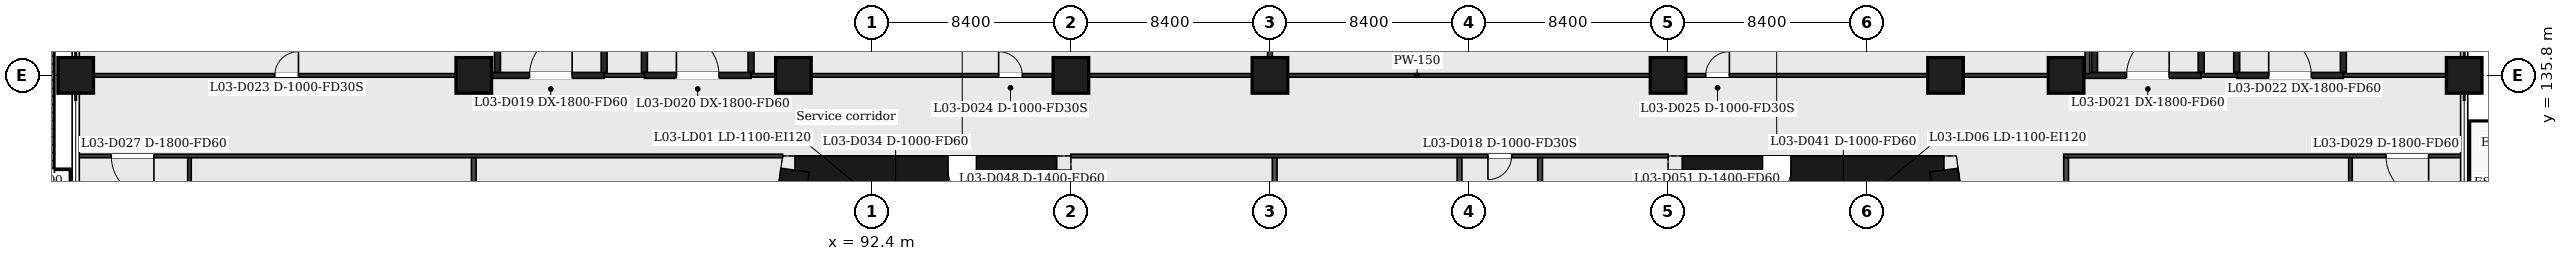
"""IFC4 building model, lengths in metres.
Left out: names, types, materials, properties, quantities, classifications, styles, units other than length and angle.
Written with IfcOpenShell. Run it as: python <this file> out.ifc"""

import sys

from ifc_helpers import new_model, si_unit, direction, frame, frame_2d, origin, origin_2d, place, context, subcontext, project, spatial, rectangle, extrude, element, fill, save


model = new_model("IFC4")
c1 = context("Model", 3, precision=1e-05, world=origin(), true_north=direction((0.0, 1.0)))
c2 = subcontext(c1, "Body", "Model", "MODEL_VIEW")
j1 = project(units=[si_unit("LENGTHUNIT", "METRE"), si_unit("PLANEANGLEUNIT", "RADIAN")], contexts=[c1])
p1 = place(None, origin())
s1 = spatial("IfcSite", under=j1, at=p1, CompositionType="ELEMENT")
p2 = place(p1, origin())
s2 = spatial("IfcBuilding", under=s1, at=p2, CompositionType="ELEMENT")
p3 = place(p2, frame((0.0, 0.0, 23.0)))
s3 = spatial("IfcBuildingStorey", under=s2, at=p3, CompositionType="ELEMENT", Elevation=23.0)
p4 = place(p3, frame((89.156, 131.8, 0.0), z_axis=(0.0, 0.0, 1.0), x_axis=(1.0, 0.0, 0.0)))
e1 = element("IfcWall", 1, at=p4, inside=s3, PredefinedType="SHEAR", context=c2, shape_type="SweptSolid", body=[
    extrude(rectangle(XDim=11.044, YDim=1.2, at=frame_2d((5.522, 0.0))), origin(), (0.0, 0.0, 1.0), 6.0),
])
p5 = place(p4, frame((6.458, 0.0, 0.0)))
e2 = element("IfcOpeningElement", 2, at=p5, cuts=e1, PredefinedType="OPENING", context=c2, shape_type="SweptSolid", body=[
    extrude(rectangle(XDim=1.2, YDim=2.1, at=frame_2d((0.6, 1.05))), frame((0.0, 0.61, 0.0), z_axis=(0.0, -1.0, 0.0), x_axis=(1.0, 0.0, 0.0)), (0.0, 0.0, 1.0), 1.22),
])
p6 = place(p3, frame((100.2, 131.8, 0.0), z_axis=(0.0, 0.0, 1.0), x_axis=(0.0, -1.0, 0.0)))
e3 = element("IfcWall", 3, at=p6, inside=s3, PredefinedType="SHEAR", context=c2, shape_type="SweptSolid", body=[
    extrude(rectangle(XDim=20.8, YDim=1.2, at=frame_2d((10.4, 0.0))), origin(), (0.0, 0.0, 1.0), 6.0),
])
p7 = place(p6, frame((7.65, 0.0, 0.0)))
e4 = element("IfcOpeningElement", 4, at=p7, cuts=e3, PredefinedType="OPENING", context=c2, shape_type="SweptSolid", body=[
    extrude(rectangle(XDim=1.4, YDim=2.1, at=frame_2d((0.7, 1.05))), frame((0.0, 0.61, 0.0), z_axis=(0.0, -1.0, 0.0), x_axis=(1.0, 0.0, 0.0)), (0.0, 0.0, 1.0), 1.22),
])
p8 = place(p3, frame((86.355, 111.0, 0.0), z_axis=(0.0, 0.0, 1.0), x_axis=(0.133413989637, 0.99106039542, 0.0)))
e5 = element("IfcWall", 5, at=p8, inside=s3, PredefinedType="SHEAR", context=c2, shape_type="SweptSolid", body=[
    extrude(rectangle(XDim=20.988, YDim=1.2, at=frame_2d((10.494, 0.0))), origin(), (0.0, 0.0, 1.0), 6.0),
])
p9 = place(p3, frame((126.6, 131.8, 0.0), z_axis=(0.0, 0.0, 1.0), x_axis=(1.0, 0.0, 0.0)))
e6 = element("IfcWall", 6, at=p9, inside=s3, PredefinedType="SHEAR", context=c2, shape_type="SweptSolid", body=[
    extrude(rectangle(XDim=11.044, YDim=1.2, at=frame_2d((5.522, 0.0))), origin(), (0.0, 0.0, 1.0), 6.0),
])
p10 = place(p9, frame((3.386, 0.0, 0.0)))
e7 = element("IfcOpeningElement", 7, at=p10, cuts=e6, PredefinedType="OPENING", context=c2, shape_type="SweptSolid", body=[
    extrude(rectangle(XDim=1.2, YDim=2.1, at=frame_2d((0.6, 1.05))), frame((0.0, 0.61, 0.0), z_axis=(0.0, -1.0, 0.0), x_axis=(1.0, 0.0, 0.0)), (0.0, 0.0, 1.0), 1.22),
])
p11 = place(p3, frame((137.645, 131.8, 0.0), z_axis=(0.0, 0.0, 1.0), x_axis=(0.133413989637, -0.99106039542, 0.0)))
e8 = element("IfcWall", 8, at=p11, inside=s3, PredefinedType="SHEAR", context=c2, shape_type="SweptSolid", body=[
    extrude(rectangle(XDim=20.988, YDim=1.2, at=frame_2d((10.494, 0.0))), origin(), (0.0, 0.0, 1.0), 6.0),
])
p12 = place(p3, frame((126.6, 111.0, 0.0), z_axis=(0.0, 0.0, 1.0), x_axis=(0.0, 1.0, 0.0)))
e9 = element("IfcWall", 9, at=p12, inside=s3, PredefinedType="SHEAR", context=c2, shape_type="SweptSolid", body=[
    extrude(rectangle(XDim=20.8, YDim=1.2, at=frame_2d((10.4, 0.0))), origin(), (0.0, 0.0, 1.0), 6.0),
])
p13 = place(p12, frame((11.75, 0.0, 0.0)))
e10 = element("IfcOpeningElement", 10, at=p13, cuts=e9, PredefinedType="OPENING", context=c2, shape_type="SweptSolid", body=[
    extrude(rectangle(XDim=1.4, YDim=2.1, at=frame_2d((0.7, 1.05))), frame((0.0, 0.61, 0.0), z_axis=(0.0, -1.0, 0.0), x_axis=(1.0, 0.0, 0.0)), (0.0, 0.0, 1.0), 1.22),
])
for number, where, z_axis, x_axis in (
    (11, (58.8, 135.8, 0.0), (0.0, 0.0, 1.0), (1.0, 0.0, 0.0)),
    (12, (75.6, 135.8, 0.0), (0.0, 0.0, 1.0), (1.0, 0.0, 0.0)),
    (13, (89.088, 135.8, 0.0), (0.0, 0.0, 1.0), (1.0, 0.0, 0.0)),
    (14, (100.8, 135.8, 0.0), (0.0, 0.0, 1.0), (1.0, 0.0, 0.0)),
    (15, (109.2, 135.8, 0.0), (0.0, 0.0, 1.0), (1.0, 0.0, 0.0)),
    (16, (126.0, 135.8, 0.0), (0.0, 0.0, 1.0), (1.0, 0.0, 0.0)),
    (17, (137.711, 135.8, 0.0), (0.0, 0.0, 1.0), (1.0, 0.0, 0.0)),
    (18, (142.8, 135.8, 0.0), (0.0, 0.0, 1.0), (1.0, 0.0, 0.0)),
    (19, (159.6, 135.8, 0.0), (0.0, 0.0, 1.0), (1.0, 0.0, 0.0)),
):
    element("IfcColumn", number, at=place(p3, frame(where, z_axis=z_axis, x_axis=x_axis)), inside=s3, PredefinedType="COLUMN", context=c2, shape_type="SweptSolid", body=[
        extrude(rectangle(XDim=1.5, YDim=1.5, at=origin_2d()), origin(), (0.0, 0.0, 1.0), 6.0),
    ])
p14 = place(p3, frame((58.85, 132.4, 0.0), z_axis=(0.0, 0.0, 1.0), x_axis=(1.0, 0.0, 0.0)))
e20 = element("IfcWall", 20, at=p14, inside=s3, PredefinedType="PARTITIONING", context=c2, shape_type="SweptSolid", body=[
    extrude(rectangle(XDim=29.781, YDim=0.15, at=frame_2d((14.891, 0.0))), origin(), (0.0, 0.0, 1.0), 5.5),
])
p15 = place(p14, frame((1.45, 0.0, 0.0)))
e21 = element("IfcOpeningElement", 21, at=p15, cuts=e20, PredefinedType="OPENING", context=c2, shape_type="SweptSolid", body=[
    extrude(rectangle(XDim=1.8, YDim=2.1, at=frame_2d((0.9, 1.05))), frame((0.0, 0.085, 0.0), z_axis=(0.0, -1.0, 0.0), x_axis=(1.0, 0.0, 0.0)), (0.0, 0.0, 1.0), 0.17),
])
p16 = place(p3, frame((100.8, 132.4, 0.0), z_axis=(0.0, 0.0, 1.0), x_axis=(1.0, 0.0, 0.0)))
e22 = element("IfcWall", 22, at=p16, inside=s3, PredefinedType="PARTITIONING", context=c2, shape_type="SweptSolid", body=[
    extrude(rectangle(XDim=25.2, YDim=0.15, at=frame_2d((12.6, 0.0))), origin(), (0.0, 0.0, 1.0), 5.5),
])
p17 = place(p16, frame((17.6, 0.0, 0.0)))
e23 = element("IfcOpeningElement", 23, at=p17, cuts=e22, PredefinedType="OPENING", context=c2, shape_type="SweptSolid", body=[
    extrude(rectangle(XDim=1.0, YDim=2.1, at=frame_2d((0.5, 1.05))), frame((0.0, 0.085, 0.0), z_axis=(0.0, -1.0, 0.0), x_axis=(1.0, 0.0, 0.0)), (0.0, 0.0, 1.0), 0.17),
])
p18 = place(p3, frame((142.7, 132.4, 0.0), z_axis=(0.0, 0.0, 1.0), x_axis=(1.0, 0.0, 0.0)))
e24 = element("IfcWall", 24, at=p18, inside=s3, PredefinedType="PARTITIONING", context=c2, shape_type="SweptSolid", body=[
    extrude(rectangle(XDim=16.85, YDim=0.15, at=frame_2d((8.425, 0.0))), origin(), (0.0, 0.0, 1.0), 5.5),
])
p19 = place(p18, frame((13.6, 0.0, 0.0)))
e25 = element("IfcOpeningElement", 25, at=p19, cuts=e24, PredefinedType="OPENING", context=c2, shape_type="SweptSolid", body=[
    extrude(rectangle(XDim=1.8, YDim=2.1, at=frame_2d((0.9, 1.05))), frame((0.0, 0.085, 0.0), z_axis=(0.0, -1.0, 0.0), x_axis=(1.0, 0.0, 0.0)), (0.0, 0.0, 1.0), 0.17),
])
p20 = place(p3, frame((76.32, 135.8, 0.0), z_axis=(0.0, 0.0, 1.0), x_axis=(1.0, 0.0, 0.0)))
e26 = element("IfcWall", 26, at=p20, inside=s3, PredefinedType="PARTITIONING", context=c2, shape_type="SweptSolid", body=[
    extrude(rectangle(XDim=4.78, YDim=0.25, at=frame_2d((2.39, 0.0))), origin(), (0.0, 0.0, 1.0), 5.5),
])
p21 = place(p20, frame((1.63, 0.0, 0.0)))
e27 = element("IfcOpeningElement", 27, at=p21, cuts=e26, PredefinedType="OPENING", context=c2, shape_type="SweptSolid", body=[
    extrude(rectangle(XDim=1.8, YDim=2.1, at=frame_2d((0.9, 1.05))), frame((0.0, 0.135, 0.0), z_axis=(0.0, -1.0, 0.0), x_axis=(1.0, 0.0, 0.0)), (0.0, 0.0, 1.0), 0.27),
])
p22 = place(p3, frame((82.8, 135.8, 0.0), z_axis=(0.0, 0.0, 1.0), x_axis=(1.0, 0.0, 0.0)))
e28 = element("IfcWall", 28, at=p22, inside=s3, PredefinedType="PARTITIONING", context=c2, shape_type="SweptSolid", body=[
    extrude(rectangle(XDim=4.5, YDim=0.25, at=frame_2d((2.25, 0.0))), origin(), (0.0, 0.0, 1.0), 5.5),
])
p23 = place(p22, frame((1.35, 0.0, 0.0)))
e29 = element("IfcOpeningElement", 29, at=p23, cuts=e28, PredefinedType="OPENING", context=c2, shape_type="SweptSolid", body=[
    extrude(rectangle(XDim=1.8, YDim=2.1, at=frame_2d((0.9, 1.05))), frame((0.0, 0.135, 0.0), z_axis=(0.0, -1.0, 0.0), x_axis=(1.0, 0.0, 0.0)), (0.0, 0.0, 1.0), 0.27),
])
p24 = place(p3, frame((143.52, 135.8, 0.0), z_axis=(0.0, 0.0, 1.0), x_axis=(1.0, 0.0, 0.0)))
e30 = element("IfcWall", 30, at=p24, inside=s3, PredefinedType="PARTITIONING", context=c2, shape_type="SweptSolid", body=[
    extrude(rectangle(XDim=4.98, YDim=0.25, at=frame_2d((2.49, 0.0))), origin(), (0.0, 0.0, 1.0), 5.5),
])
p25 = place(p24, frame((1.83, 0.0, 0.0)))
e31 = element("IfcOpeningElement", 31, at=p25, cuts=e30, PredefinedType="OPENING", context=c2, shape_type="SweptSolid", body=[
    extrude(rectangle(XDim=1.8, YDim=2.1, at=frame_2d((0.9, 1.05))), frame((0.0, 0.135, 0.0), z_axis=(0.0, -1.0, 0.0), x_axis=(1.0, 0.0, 0.0)), (0.0, 0.0, 1.0), 0.27),
])
p26 = place(p3, frame((150.0, 135.8, 0.0), z_axis=(0.0, 0.0, 1.0), x_axis=(1.0, 0.0, 0.0)))
e32 = element("IfcWall", 32, at=p26, inside=s3, PredefinedType="PARTITIONING", context=c2, shape_type="SweptSolid", body=[
    extrude(rectangle(XDim=4.5, YDim=0.25, at=frame_2d((2.25, 0.0))), origin(), (0.0, 0.0, 1.0), 5.5),
])
p27 = place(p26, frame((1.35, 0.0, 0.0)))
e33 = element("IfcOpeningElement", 33, at=p27, cuts=e32, PredefinedType="OPENING", context=c2, shape_type="SweptSolid", body=[
    extrude(rectangle(XDim=1.8, YDim=2.1, at=frame_2d((0.9, 1.05))), frame((0.0, 0.135, 0.0), z_axis=(0.0, -1.0, 0.0), x_axis=(1.0, 0.0, 0.0)), (0.0, 0.0, 1.0), 0.27),
])
p28 = place(p3, frame((58.85, 135.8, 0.0), z_axis=(0.0, 0.0, 1.0), x_axis=(1.0, 0.0, 0.0)))
e34 = element("IfcWall", 34, at=p28, inside=s3, PredefinedType="PARTITIONING", context=c2, shape_type="SweptSolid", body=[
    extrude(rectangle(XDim=17.47, YDim=0.15, at=frame_2d((8.735, 0.0))), origin(), (0.0, 0.0, 1.0), 5.5),
])
p29 = place(p28, frame((8.35, 0.0, 0.0)))
e35 = element("IfcOpeningElement", 35, at=p29, cuts=e34, PredefinedType="OPENING", context=c2, shape_type="SweptSolid", body=[
    extrude(rectangle(XDim=1.0, YDim=2.1, at=frame_2d((0.5, 1.05))), frame((0.0, 0.085, 0.0), z_axis=(0.0, -1.0, 0.0), x_axis=(1.0, 0.0, 0.0)), (0.0, 0.0, 1.0), 0.17),
])
p30 = place(p3, frame((81.1, 135.8, 0.0), z_axis=(0.0, 0.0, 1.0), x_axis=(1.0, 0.0, 0.0)))
e36 = element("IfcWall", 36, at=p30, inside=s3, PredefinedType="PARTITIONING", context=c2, shape_type="SweptSolid", body=[
    extrude(rectangle(XDim=1.7, YDim=0.15, at=frame_2d((0.85, 0.0))), origin(), (0.0, 0.0, 1.0), 5.5),
])
p31 = place(p3, frame((87.3, 135.8, 0.0), z_axis=(0.0, 0.0, 1.0), x_axis=(1.0, 0.0, 0.0)))
e37 = element("IfcWall", 37, at=p31, inside=s3, PredefinedType="PARTITIONING", context=c2, shape_type="SweptSolid", body=[
    extrude(rectangle(XDim=56.22, YDim=0.15, at=frame_2d((28.11, 0.0))), origin(), (0.0, 0.0, 1.0), 5.5),
])
p32 = place(p31, frame((10.45, 0.0, 0.0)))
e38 = element("IfcOpeningElement", 38, at=p32, cuts=e37, PredefinedType="OPENING", context=c2, shape_type="SweptSolid", body=[
    extrude(rectangle(XDim=1.0, YDim=2.1, at=frame_2d((0.5, 1.05))), frame((0.0, 0.085, 0.0), z_axis=(0.0, -1.0, 0.0), x_axis=(1.0, 0.0, 0.0)), (0.0, 0.0, 1.0), 0.17),
])
p33 = place(p31, frame((40.29, 0.0, 0.0)))
e39 = element("IfcOpeningElement", 39, at=p33, cuts=e37, PredefinedType="OPENING", context=c2, shape_type="SweptSolid", body=[
    extrude(rectangle(XDim=1.0, YDim=2.1, at=frame_2d((0.5, 1.05))), frame((0.0, 0.085, 0.0), z_axis=(0.0, -1.0, 0.0), x_axis=(1.0, 0.0, 0.0)), (0.0, 0.0, 1.0), 0.17),
])
p34 = place(p3, frame((148.5, 135.8, 0.0), z_axis=(0.0, 0.0, 1.0), x_axis=(1.0, 0.0, 0.0)))
e40 = element("IfcWall", 40, at=p34, inside=s3, PredefinedType="PARTITIONING", context=c2, shape_type="SweptSolid", body=[
    extrude(rectangle(XDim=1.5, YDim=0.15, at=frame_2d((0.75, 0.0))), origin(), (0.0, 0.0, 1.0), 5.5),
])
p35 = place(p3, frame((154.5, 135.8, 0.0), z_axis=(0.0, 0.0, 1.0), x_axis=(1.0, 0.0, 0.0)))
e41 = element("IfcWall", 41, at=p35, inside=s3, PredefinedType="PARTITIONING", context=c2, shape_type="SweptSolid", body=[
    extrude(rectangle(XDim=5.05, YDim=0.15, at=frame_2d((2.525, 0.0))), origin(), (0.0, 0.0, 1.0), 5.5),
])
p36 = place(p3, frame((63.6, 110.475, 0.0), z_axis=(0.0, 0.0, 1.0), x_axis=(0.0, 1.0, 0.0)))
e42 = element("IfcWall", 42, at=p36, inside=s3, PredefinedType="PARTITIONING", context=c2, shape_type="SweptSolid", body=[
    extrude(rectangle(XDim=21.85, YDim=0.15, at=frame_2d((10.925, 0.0))), origin(), (0.0, 0.0, 1.0), 5.5),
])
p37 = place(p3, frame((75.6, 110.475, 0.0), z_axis=(0.0, 0.0, 1.0), x_axis=(0.0, 1.0, 0.0)))
e43 = element("IfcWall", 43, at=p37, inside=s3, PredefinedType="PARTITIONING", context=c2, shape_type="SweptSolid", body=[
    extrude(rectangle(XDim=21.85, YDim=0.2, at=frame_2d((10.925, 0.0))), origin(), (0.0, 0.0, 1.0), 5.1),
])
for number, where, z_axis, x_axis in (
    (44, (76.6, 135.925, 0.0), (0.0, 0.0, 1.0), (0.0, 1.0, 0.0)),
    (45, (81.1, 135.925, 0.0), (0.0, 0.0, 1.0), (0.0, 1.0, 0.0)),
    (46, (82.8, 135.925, 0.0), (0.0, 0.0, 1.0), (0.0, 1.0, 0.0)),
    (47, (87.3, 135.925, 0.0), (0.0, 0.0, 1.0), (0.0, 1.0, 0.0)),
):
    element("IfcWall", number, at=place(p3, frame(where, z_axis=z_axis, x_axis=x_axis)), inside=s3, PredefinedType="PARTITIONING", context=c2, shape_type="SweptSolid", body=[
        extrude(rectangle(XDim=8.825, YDim=0.25, at=frame_2d((4.413, 0.0))), origin(), (0.0, 0.0, 1.0), 5.5),
    ])
p38 = place(p3, frame((109.2, 135.875, 0.0), z_axis=(0.0, 0.0, 1.0), x_axis=(0.0, 1.0, 0.0)))
e48 = element("IfcWall", 48, at=p38, inside=s3, PredefinedType="PARTITIONING", context=c2, shape_type="SweptSolid", body=[
    extrude(rectangle(XDim=8.875, YDim=0.2, at=frame_2d((4.438, 0.0))), origin(), (0.0, 0.0, 1.0), 5.5),
])
for number, where, z_axis, x_axis in (
    (49, (109.4, 122.975, 0.0), (0.0, 0.0, 1.0), (0.0, 1.0, 0.0)),
    (50, (117.2, 122.975, 0.0), (0.0, 0.0, 1.0), (0.0, 1.0, 0.0)),
    (51, (120.6, 122.975, 0.0), (0.0, 0.0, 1.0), (0.0, 1.0, 0.0)),
):
    element("IfcWall", number, at=place(p3, frame(where, z_axis=z_axis, x_axis=x_axis)), inside=s3, PredefinedType="PARTITIONING", context=c2, shape_type="SweptSolid", body=[
        extrude(rectangle(XDim=9.35, YDim=0.2, at=frame_2d((4.675, 0.0))), origin(), (0.0, 0.0, 1.0), 5.5),
    ])
p39 = place(p3, frame((142.8, 110.475, 0.0), z_axis=(0.0, 0.0, 1.0), x_axis=(0.0, 1.0, 0.0)))
e52 = element("IfcWall", 52, at=p39, inside=s3, PredefinedType="PARTITIONING", context=c2, shape_type="SweptSolid", body=[
    extrude(rectangle(XDim=21.85, YDim=0.2, at=frame_2d((10.925, 0.0))), origin(), (0.0, 0.0, 1.0), 5.5),
])
p40 = place(p3, frame((143.7, 135.875, 0.0), z_axis=(0.0, 0.0, 1.0), x_axis=(0.0, 1.0, 0.0)))
e53 = element("IfcWall", 53, at=p40, inside=s3, PredefinedType="PARTITIONING", context=c2, shape_type="SweptSolid", body=[
    extrude(rectangle(XDim=8.875, YDim=0.2, at=frame_2d((4.438, 0.0))), origin(), (0.0, 0.0, 1.0), 5.5),
])
for number, where, z_axis, x_axis in (
    (54, (144.0, 135.925, 0.0), (0.0, 0.0, 1.0), (0.0, 1.0, 0.0)),
    (55, (148.5, 135.925, 0.0), (0.0, 0.0, 1.0), (0.0, 1.0, 0.0)),
    (56, (150.0, 135.925, 0.0), (0.0, 0.0, 1.0), (0.0, 1.0, 0.0)),
    (57, (154.5, 135.925, 0.0), (0.0, 0.0, 1.0), (0.0, 1.0, 0.0)),
):
    element("IfcWall", number, at=place(p3, frame(where, z_axis=z_axis, x_axis=x_axis)), inside=s3, PredefinedType="PARTITIONING", context=c2, shape_type="SweptSolid", body=[
        extrude(rectangle(XDim=8.825, YDim=0.25, at=frame_2d((4.413, 0.0))), origin(), (0.0, 0.0, 1.0), 5.5),
    ])
p41 = place(p3, frame((154.8, 110.475, 0.0), z_axis=(0.0, 0.0, 1.0), x_axis=(0.0, 1.0, 0.0)))
e58 = element("IfcWall", 58, at=p41, inside=s3, PredefinedType="PARTITIONING", context=c2, shape_type="SweptSolid", body=[
    extrude(rectangle(XDim=21.85, YDim=0.15, at=frame_2d((10.925, 0.0))), origin(), (0.0, 0.0, 1.0), 5.5),
])
p42 = place(p17, origin())
e59 = element("IfcDoor", 59, at=p42, inside=s3, OperationType="SINGLE_SWING_LEFT", PredefinedType="DOOR", context=c2, shape_type="SweptSolid", body=[
    extrude(rectangle(XDim=1.0, YDim=2.1, at=frame_2d((0.5, 1.05))), frame((0.0, 0.025, 0.0), z_axis=(0.0, -1.0, 0.0), x_axis=(1.0, 0.0, 0.0)), (0.0, 0.0, 1.0), 0.05),
])
fill(e23, e59)
p43 = place(p21, origin())
e60 = element("IfcDoor", 60, at=p43, inside=s3, OperationType="SINGLE_SWING_RIGHT", PredefinedType="DOOR", context=c2, shape_type="SweptSolid", body=[
    extrude(rectangle(XDim=1.8, YDim=2.1, at=frame_2d((0.9, 1.05))), frame((0.0, 0.025, 0.0), z_axis=(0.0, -1.0, 0.0), x_axis=(1.0, 0.0, 0.0)), (0.0, 0.0, 1.0), 0.05),
])
fill(e27, e60)
p44 = place(p23, origin())
e61 = element("IfcDoor", 61, at=p44, inside=s3, OperationType="SINGLE_SWING_LEFT", PredefinedType="DOOR", context=c2, shape_type="SweptSolid", body=[
    extrude(rectangle(XDim=1.8, YDim=2.1, at=frame_2d((0.9, 1.05))), frame((0.0, 0.025, 0.0), z_axis=(0.0, -1.0, 0.0), x_axis=(1.0, 0.0, 0.0)), (0.0, 0.0, 1.0), 0.05),
])
fill(e29, e61)
p45 = place(p25, origin())
e62 = element("IfcDoor", 62, at=p45, inside=s3, OperationType="SINGLE_SWING_RIGHT", PredefinedType="DOOR", context=c2, shape_type="SweptSolid", body=[
    extrude(rectangle(XDim=1.8, YDim=2.1, at=frame_2d((0.9, 1.05))), frame((0.0, 0.025, 0.0), z_axis=(0.0, -1.0, 0.0), x_axis=(1.0, 0.0, 0.0)), (0.0, 0.0, 1.0), 0.05),
])
fill(e31, e62)
p46 = place(p27, origin())
e63 = element("IfcDoor", 63, at=p46, inside=s3, OperationType="SINGLE_SWING_LEFT", PredefinedType="DOOR", context=c2, shape_type="SweptSolid", body=[
    extrude(rectangle(XDim=1.8, YDim=2.1, at=frame_2d((0.9, 1.05))), frame((0.0, 0.025, 0.0), z_axis=(0.0, -1.0, 0.0), x_axis=(1.0, 0.0, 0.0)), (0.0, 0.0, 1.0), 0.05),
])
fill(e33, e63)
p47 = place(p29, origin())
e64 = element("IfcDoor", 64, at=p47, inside=s3, OperationType="SINGLE_SWING_RIGHT", PredefinedType="DOOR", context=c2, shape_type="SweptSolid", body=[
    extrude(rectangle(XDim=1.0, YDim=2.1, at=frame_2d((0.5, 1.05))), frame((0.0, 0.025, 0.0), z_axis=(0.0, -1.0, 0.0), x_axis=(1.0, 0.0, 0.0)), (0.0, 0.0, 1.0), 0.05),
])
fill(e35, e64)
p48 = place(p32, origin())
e65 = element("IfcDoor", 65, at=p48, inside=s3, OperationType="SINGLE_SWING_LEFT", PredefinedType="DOOR", context=c2, shape_type="SweptSolid", body=[
    extrude(rectangle(XDim=1.0, YDim=2.1, at=frame_2d((0.5, 1.05))), frame((0.0, 0.025, 0.0), z_axis=(0.0, -1.0, 0.0), x_axis=(1.0, 0.0, 0.0)), (0.0, 0.0, 1.0), 0.05),
])
fill(e38, e65)
p49 = place(p33, origin())
e66 = element("IfcDoor", 66, at=p49, inside=s3, OperationType="SINGLE_SWING_RIGHT", PredefinedType="DOOR", context=c2, shape_type="SweptSolid", body=[
    extrude(rectangle(XDim=1.0, YDim=2.1, at=frame_2d((0.5, 1.05))), frame((0.0, 0.025, 0.0), z_axis=(0.0, -1.0, 0.0), x_axis=(1.0, 0.0, 0.0)), (0.0, 0.0, 1.0), 0.05),
])
fill(e39, e66)
p50 = place(p15, origin())
e67 = element("IfcDoor", 67, at=p50, inside=s3, OperationType="SINGLE_SWING_RIGHT", PredefinedType="DOOR", context=c2, shape_type="SweptSolid", body=[
    extrude(rectangle(XDim=1.8, YDim=2.1, at=frame_2d((0.9, 1.05))), frame((0.0, 0.025, 0.0), z_axis=(0.0, -1.0, 0.0), x_axis=(1.0, 0.0, 0.0)), (0.0, 0.0, 1.0), 0.05),
])
fill(e21, e67)
p51 = place(p19, origin())
e68 = element("IfcDoor", 68, at=p51, inside=s3, OperationType="SINGLE_SWING_RIGHT", PredefinedType="DOOR", context=c2, shape_type="SweptSolid", body=[
    extrude(rectangle(XDim=1.8, YDim=2.1, at=frame_2d((0.9, 1.05))), frame((0.0, 0.025, 0.0), z_axis=(0.0, -1.0, 0.0), x_axis=(1.0, 0.0, 0.0)), (0.0, 0.0, 1.0), 0.05),
])
fill(e25, e68)
p52 = place(p5, origin())
e69 = element("IfcDoor", 69, at=p52, inside=s3, OperationType="SINGLE_SWING_RIGHT", PredefinedType="DOOR", context=c2, shape_type="SweptSolid", body=[
    extrude(rectangle(XDim=1.2, YDim=2.1, at=frame_2d((0.6, 1.05))), frame((0.0, 0.025, 0.0), z_axis=(0.0, -1.0, 0.0), x_axis=(1.0, 0.0, 0.0)), (0.0, 0.0, 1.0), 0.05),
])
fill(e2, e69)
p53 = place(p10, origin())
e70 = element("IfcDoor", 70, at=p53, inside=s3, OperationType="SINGLE_SWING_LEFT", PredefinedType="DOOR", context=c2, shape_type="SweptSolid", body=[
    extrude(rectangle(XDim=1.2, YDim=2.1, at=frame_2d((0.6, 1.05))), frame((0.0, 0.025, 0.0), z_axis=(0.0, -1.0, 0.0), x_axis=(1.0, 0.0, 0.0)), (0.0, 0.0, 1.0), 0.05),
])
fill(e7, e70)
save(model, sys.argv[1])
